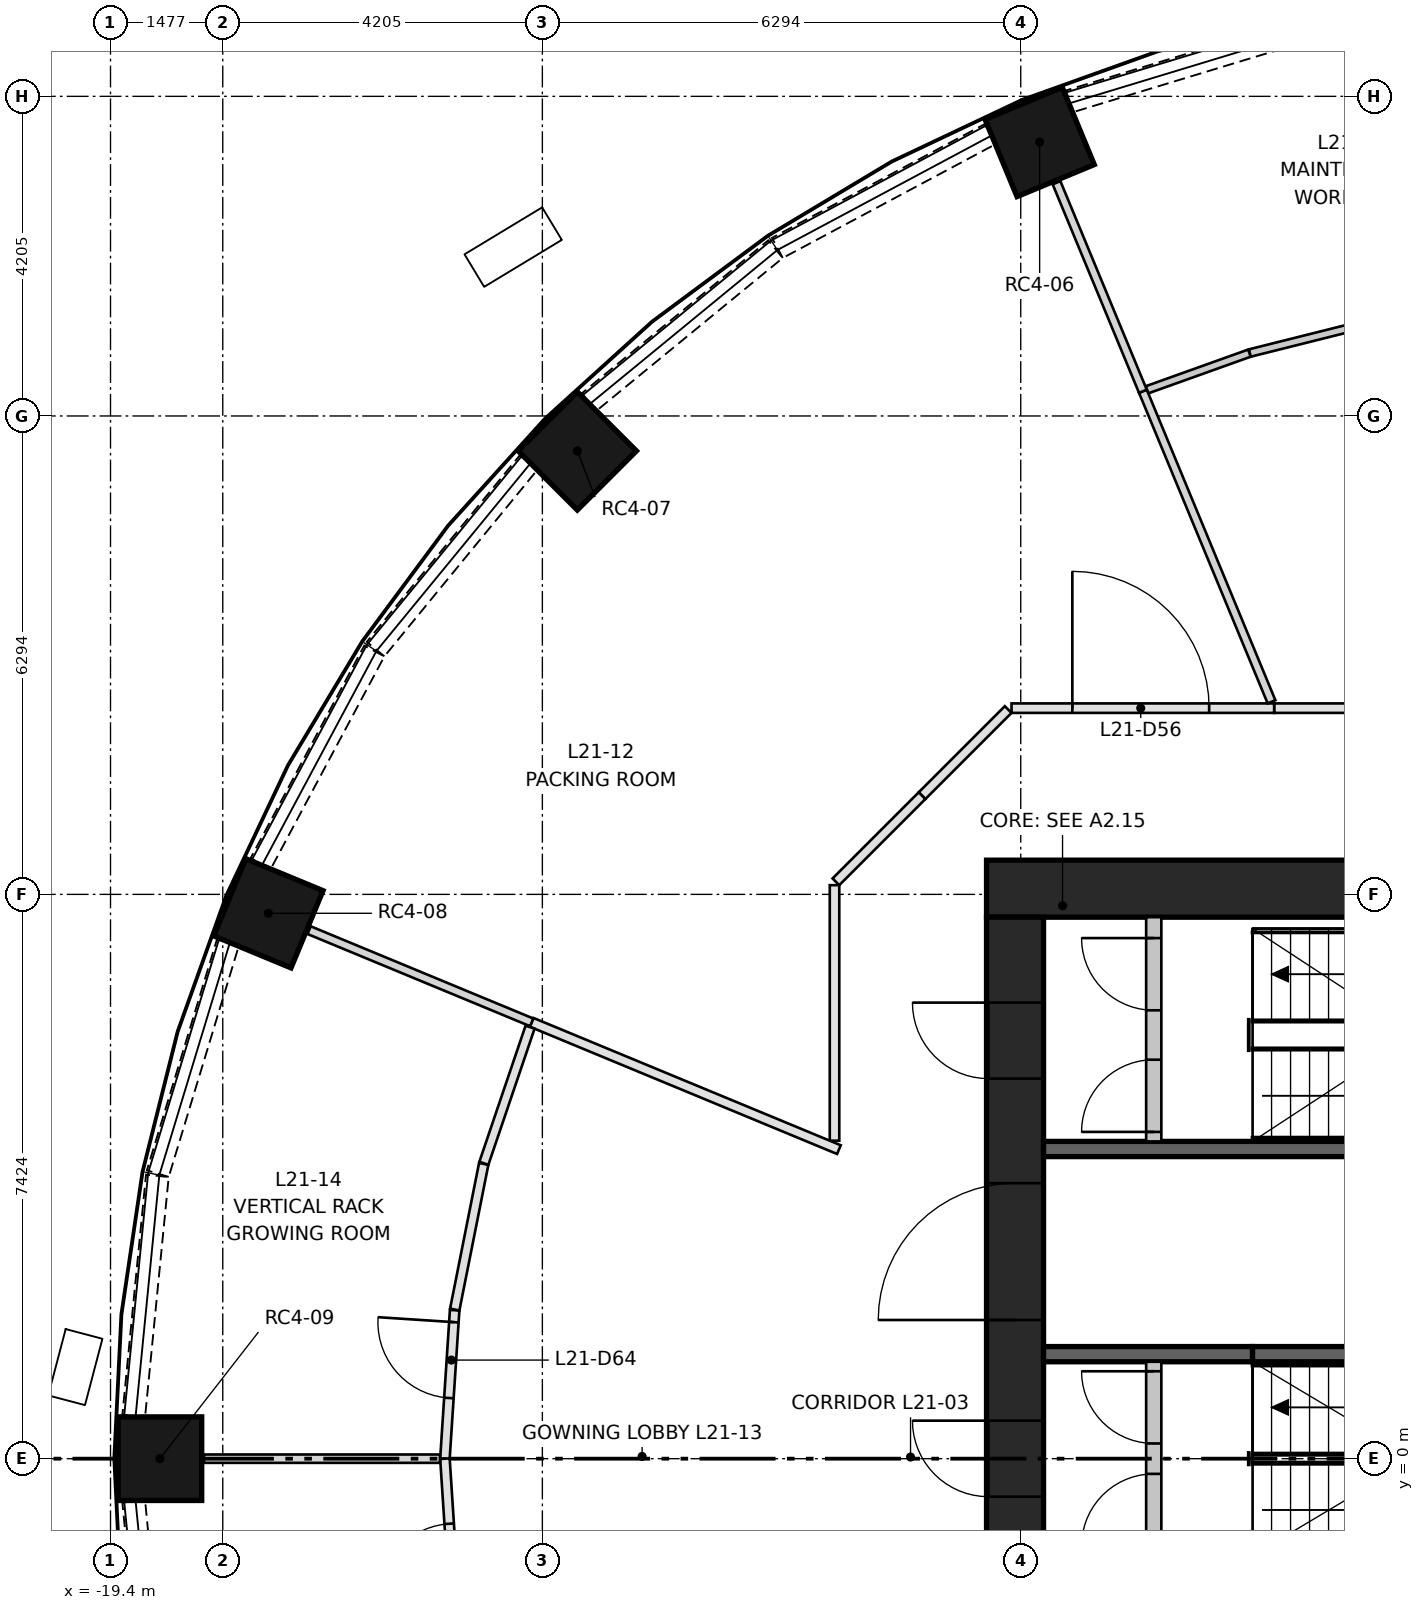
"""IFC4 building model, lengths in metres.
Left out: names, types, materials, properties, quantities, classifications, styles, units other than length and angle.
Written with IfcOpenShell. Run it as: python <this file> out.ifc"""

import sys

from ifc_helpers import new_model, si_unit, direction, frame, frame_2d, origin, origin_2d, place, context, subcontext, project, spatial, rectangle, extrude, element, fill, save


model = new_model("IFC4")
c1 = context("Model", 3, precision=1e-05, world=origin(), true_north=direction((0.0, 1.0)))
c2 = subcontext(c1, "Body", "Model", "MODEL_VIEW")
j1 = project(units=[si_unit("LENGTHUNIT", "METRE"), si_unit("PLANEANGLEUNIT", "RADIAN")], contexts=[c1])
p1 = place(None, origin())
s1 = spatial("IfcSite", under=j1, at=p1, CompositionType="ELEMENT")
p2 = place(p1, origin())
s2 = spatial("IfcBuilding", under=s1, at=p2, CompositionType="ELEMENT")
p3 = place(p2, frame((0.0, 0.0, 83.7)))
s3 = spatial("IfcBuildingStorey", under=s2, at=p3, CompositionType="ELEMENT", Elevation=83.7)
for number, where, z_axis, x_axis in (
    (1, (-7.175, 17.323, 0.0), (0.0, 0.0, 1.0), (-0.383, 0.924, 0.0)),
    (2, (-13.258, 13.258, 0.0), (0.0, 0.0, 1.0), (-0.707, 0.707, 0.0)),
    (3, (-17.323, 7.175, 0.0), (0.0, 0.0, 1.0), (-0.924, 0.383, 0.0)),
    (4, (-18.75, 0.0, 0.0), (0.0, 0.0, 1.0), (-1.0, 0.0, 0.0)),
):
    element("IfcColumn", number, at=place(p3, frame(where, z_axis=z_axis, x_axis=x_axis)), inside=s3, PredefinedType="COLUMN", context=c2, shape_type="SweptSolid", body=[
        extrude(rectangle(XDim=1.1, YDim=1.1, at=origin_2d()), origin(), (0.0, 0.0, 1.0), 3.65),
    ])
p4 = place(p3, frame((-7.874, 7.499, 0.0), z_axis=(0.0, 0.0, 1.0), x_axis=(1.0, 0.0, 0.0)))
e5 = element("IfcWall", 5, at=p4, inside=s3, PredefinedType="SHEAR", context=c2, shape_type="SweptSolid", body=[
    extrude(rectangle(XDim=15.748, YDim=0.75, at=frame_2d((7.874, 0.0))), origin(), (0.0, 0.0, 1.0), 3.65),
])
p5 = place(p3, frame((-7.499, -7.124, 0.0), z_axis=(0.0, 0.0, 1.0), x_axis=(0.0, 1.0, 0.0)))
e6 = element("IfcWall", 6, at=p5, inside=s3, PredefinedType="SHEAR", context=c2, shape_type="SweptSolid", body=[
    extrude(rectangle(XDim=14.248, YDim=0.75, at=frame_2d((7.124, 0.0))), origin(), (0.0, 0.0, 1.0), 3.65),
])
p6 = place(p5, frame((6.624, 0.0, 0.0)))
e7 = element("IfcOpeningElement", 7, at=p6, cuts=e6, PredefinedType="OPENING", context=c2, shape_type="SweptSolid", body=[
    extrude(rectangle(XDim=1.0, YDim=2.1, at=frame_2d((0.5, 1.05))), frame((0.0, 0.385, 0.0), z_axis=(0.0, -1.0, 0.0), x_axis=(1.0, 0.0, 0.0)), (0.0, 0.0, 1.0), 0.77),
])
p7 = place(p5, frame((3.5, 0.0, 0.0)))
e8 = element("IfcOpeningElement", 8, at=p7, cuts=e6, PredefinedType="OPENING", context=c2, shape_type="SweptSolid", body=[
    extrude(rectangle(XDim=1.8, YDim=2.1, at=frame_2d((0.9, 1.05))), frame((0.0, 0.385, 0.0), z_axis=(0.0, -1.0, 0.0), x_axis=(1.0, 0.0, 0.0)), (0.0, 0.0, 1.0), 0.77),
])
p8 = place(p5, frame((8.948, 0.0, 0.0)))
e9 = element("IfcOpeningElement", 9, at=p8, cuts=e6, PredefinedType="OPENING", context=c2, shape_type="SweptSolid", body=[
    extrude(rectangle(XDim=1.8, YDim=2.1, at=frame_2d((0.9, 1.05))), frame((0.0, 0.385, 0.0), z_axis=(0.0, -1.0, 0.0), x_axis=(1.0, 0.0, 0.0)), (0.0, 0.0, 1.0), 0.77),
])
p9 = place(p5, frame((12.124, 0.0, 0.0)))
e10 = element("IfcOpeningElement", 10, at=p9, cuts=e6, PredefinedType="OPENING", context=c2, shape_type="SweptSolid", body=[
    extrude(rectangle(XDim=1.0, YDim=2.1, at=frame_2d((0.5, 1.05))), frame((0.0, 0.385, 0.0), z_axis=(0.0, -1.0, 0.0), x_axis=(1.0, 0.0, 0.0)), (0.0, 0.0, 1.0), 0.77),
])
p10 = place(p3, frame((-7.124, 4.074, 0.0), z_axis=(0.0, 0.0, 1.0), x_axis=(1.0, 0.0, 0.0)))
e11 = element("IfcWall", 11, at=p10, inside=s3, PredefinedType="SHEAR", context=c2, shape_type="SweptSolid", body=[
    extrude(rectangle(XDim=7.124, YDim=0.2, at=frame_2d((3.562, 0.0))), origin(), (0.0, 0.0, 1.0), 3.3),
])
p11 = place(p3, frame((-7.124, 1.375, 0.0), z_axis=(0.0, 0.0, 1.0), x_axis=(1.0, 0.0, 0.0)))
e12 = element("IfcWall", 12, at=p11, inside=s3, PredefinedType="SHEAR", context=c2, shape_type="SweptSolid", body=[
    extrude(rectangle(XDim=2.75, YDim=0.2, at=frame_2d((1.375, 0.0))), origin(), (0.0, 0.0, 1.0), 3.3),
])
p12 = place(p3, frame((-4.374, 1.375, 0.0), z_axis=(0.0, 0.0, 1.0), x_axis=(1.0, 0.0, 0.0)))
e13 = element("IfcWall", 13, at=p12, inside=s3, PredefinedType="SHEAR", context=c2, shape_type="SweptSolid", body=[
    extrude(rectangle(XDim=4.374, YDim=0.2, at=frame_2d((2.187, 0.0))), origin(), (0.0, 0.0, 1.0), 3.3),
])
p13 = place(p3, frame((-5.674, -1.275, 0.0), z_axis=(0.0, 0.0, 1.0), x_axis=(0.0, 1.0, 0.0)))
e14 = element("IfcWall", 14, at=p13, inside=s3, PredefinedType="PARTITIONING", context=c2, shape_type="SweptSolid", body=[
    extrude(rectangle(XDim=2.55, YDim=0.2, at=frame_2d((1.275, 0.0))), origin(), (0.0, 0.0, 1.0), 3.3),
])
p14 = place(p13, frame((0.125, 0.0, 0.0)))
e15 = element("IfcOpeningElement", 15, at=p14, cuts=e14, PredefinedType="OPENING", context=c2, shape_type="SweptSolid", body=[
    extrude(rectangle(XDim=0.95, YDim=2.1, at=frame_2d((0.475, 1.05))), frame((0.0, 0.11, 0.0), z_axis=(0.0, -1.0, 0.0), x_axis=(1.0, 0.0, 0.0)), (0.0, 0.0, 1.0), 0.22),
])
p15 = place(p13, frame((1.475, 0.0, 0.0)))
e16 = element("IfcOpeningElement", 16, at=p15, cuts=e14, PredefinedType="OPENING", context=c2, shape_type="SweptSolid", body=[
    extrude(rectangle(XDim=0.95, YDim=2.1, at=frame_2d((0.475, 1.05))), frame((0.0, 0.11, 0.0), z_axis=(0.0, -1.0, 0.0), x_axis=(1.0, 0.0, 0.0)), (0.0, 0.0, 1.0), 0.22),
])
p16 = place(p3, frame((-5.674, 4.174, 0.0), z_axis=(0.0, 0.0, 1.0), x_axis=(0.0, 1.0, 0.0)))
e17 = element("IfcWall", 17, at=p16, inside=s3, PredefinedType="PARTITIONING", context=c2, shape_type="SweptSolid", body=[
    extrude(rectangle(XDim=2.95, YDim=0.2, at=frame_2d((1.475, 0.0))), origin(), (0.0, 0.0, 1.0), 3.3),
])
p17 = place(p16, frame((0.125, 0.0, 0.0)))
e18 = element("IfcOpeningElement", 18, at=p17, cuts=e17, PredefinedType="OPENING", context=c2, shape_type="SweptSolid", body=[
    extrude(rectangle(XDim=0.95, YDim=2.1, at=frame_2d((0.475, 1.05))), frame((0.0, 0.11, 0.0), z_axis=(0.0, -1.0, 0.0), x_axis=(1.0, 0.0, 0.0)), (0.0, 0.0, 1.0), 0.22),
])
p18 = place(p16, frame((1.725, 0.0, 0.0)))
e19 = element("IfcOpeningElement", 19, at=p18, cuts=e17, PredefinedType="OPENING", context=c2, shape_type="SweptSolid", body=[
    extrude(rectangle(XDim=0.95, YDim=2.1, at=frame_2d((0.475, 1.05))), frame((0.0, 0.11, 0.0), z_axis=(0.0, -1.0, 0.0), x_axis=(1.0, 0.0, 0.0)), (0.0, 0.0, 1.0), 0.22),
])
p19 = place(p3, frame((-3.75, 18.778, 0.0), z_axis=(0.0, 0.0, 1.0), x_axis=(-0.956927923582, -0.290325591482, 0.0)))
e20 = element("IfcWall", 20, at=p19, inside=s3, PredefinedType="SOLIDWALL", context=c2, shape_type="SweptSolid", body=[
    extrude(rectangle(XDim=3.173, YDim=0.3, at=frame_2d((1.586, 0.0))), origin(), (0.0, 0.0, 1.0), 0.9),
])
p20 = place(p3, frame((-7.828, 17.425, 0.0), z_axis=(0.0, 0.0, 1.0), x_axis=(-0.88188808669, -0.471458802606, 0.0)))
e21 = element("IfcWall", 21, at=p20, inside=s3, PredefinedType="SOLIDWALL", context=c2, shape_type="SweptSolid", body=[
    extrude(rectangle(XDim=3.172, YDim=0.3, at=frame_2d((1.586, 0.0))), origin(), (0.0, 0.0, 1.0), 0.9),
])
for number, where, z_axis, x_axis in (
    (22, (-10.651, 15.913, 0.0), (0.0, 0.0, 1.0), (-0.773, -0.634, 0.0)),
    (23, (-13.9, 13.104, 0.0), (0.0, 0.0, 1.0), (-0.634, -0.773, 0.0)),
):
    element("IfcWall", number, at=place(p3, frame(where, z_axis=z_axis, x_axis=x_axis)), inside=s3, PredefinedType="SOLIDWALL", context=c2, shape_type="SweptSolid", body=[
        extrude(rectangle(XDim=3.173, YDim=0.3, at=frame_2d((1.586, 0.0))), origin(), (0.0, 0.0, 1.0), 0.9),
    ])
p21 = place(p3, frame((-15.929, 10.626, 0.0), z_axis=(0.0, 0.0, 1.0), x_axis=(-0.471458802606, -0.88188808669, 0.0)))
e24 = element("IfcWall", 24, at=p21, inside=s3, PredefinedType="SOLIDWALL", context=c2, shape_type="SweptSolid", body=[
    extrude(rectangle(XDim=3.172, YDim=0.3, at=frame_2d((1.586, 0.0))), origin(), (0.0, 0.0, 1.0), 0.9),
])
p22 = place(p3, frame((-17.856, 6.787, 0.0), z_axis=(0.0, 0.0, 1.0), x_axis=(-0.290325591482, -0.956927923582, 0.0)))
e25 = element("IfcWall", 25, at=p22, inside=s3, PredefinedType="SOLIDWALL", context=c2, shape_type="SweptSolid", body=[
    extrude(rectangle(XDim=3.173, YDim=0.3, at=frame_2d((1.586, 0.0))), origin(), (0.0, 0.0, 1.0), 0.9),
])
for number, where, z_axis, x_axis in (
    (26, (-18.783, 3.721, 0.0), (0.0, 0.0, 1.0), (-0.098, -0.995, 0.0)),
    (27, (-19.094, -0.564, 0.0), (0.0, 0.0, 1.0), (0.098, -0.995, 0.0)),
):
    element("IfcWall", number, at=place(p3, frame(where, z_axis=z_axis, x_axis=x_axis)), inside=s3, PredefinedType="SOLIDWALL", context=c2, shape_type="SweptSolid", body=[
        extrude(rectangle(XDim=3.173, YDim=0.3, at=frame_2d((1.586, 0.0))), origin(), (0.0, 0.0, 1.0), 0.9),
    ])
p23 = place(p3, frame((-4.09, 9.874, 0.0), z_axis=(0.0, 0.0, 1.0), x_axis=(1.0, 0.0, 0.0)))
e28 = element("IfcWall", 28, at=p23, inside=s3, PredefinedType="PARTITIONING", context=c2, shape_type="SweptSolid", body=[
    extrude(rectangle(XDim=8.18, YDim=0.125, at=frame_2d((4.09, 0.0))), origin(), (0.0, 0.0, 1.0), 3.3),
])
p24 = place(p23, frame((3.6, 0.0, 0.0)))
e29 = element("IfcOpeningElement", 29, at=p24, cuts=e28, PredefinedType="OPENING", context=c2, shape_type="SweptSolid", body=[
    extrude(rectangle(XDim=1.0, YDim=2.1, at=frame_2d((0.5, 1.05))), frame((0.0, 0.073, 0.0), z_axis=(0.0, -1.0, 0.0), x_axis=(1.0, 0.0, 0.0)), (0.0, 0.0, 1.0), 0.145),
])
p25 = place(p3, frame((-8.722, 8.722, 0.0), z_axis=(0.0, 0.0, 1.0), x_axis=(0.707030604857, 0.70718294931, 0.0)))
e30 = element("IfcWall", 30, at=p25, inside=s3, PredefinedType="PARTITIONING", context=c2, shape_type="SweptSolid", body=[
    extrude(rectangle(XDim=1.603, YDim=0.125, at=frame_2d((0.801, 0.0))), origin(), (0.0, 0.0, 1.0), 3.3),
])
p26 = place(p3, frame((-7.545, 9.874, 0.0), z_axis=(0.0, 0.0, 1.0), x_axis=(1.0, 0.0, 0.0)))
e31 = element("IfcWall", 31, at=p26, inside=s3, PredefinedType="PARTITIONING", context=c2, shape_type="SweptSolid", body=[
    extrude(rectangle(XDim=3.455, YDim=0.125, at=frame_2d((1.728, 0.0))), origin(), (0.0, 0.0, 1.0), 3.3),
])
p27 = place(p26, frame((0.8, 0.0, 0.0)))
e32 = element("IfcOpeningElement", 32, at=p27, cuts=e31, PredefinedType="OPENING", context=c2, shape_type="SweptSolid", body=[
    extrude(rectangle(XDim=1.8, YDim=2.1, at=frame_2d((0.9, 1.05))), frame((0.0, 0.073, 0.0), z_axis=(0.0, -1.0, 0.0), x_axis=(1.0, 0.0, 0.0)), (0.0, 0.0, 1.0), 0.145),
])
p28 = place(p3, frame((-9.874, 4.183, 0.0), z_axis=(0.0, 0.0, 1.0), x_axis=(0.0, 1.0, 0.0)))
e33 = element("IfcWall", 33, at=p28, inside=s3, PredefinedType="PARTITIONING", context=c2, shape_type="SweptSolid", body=[
    extrude(rectangle(XDim=3.362, YDim=0.125, at=frame_2d((1.681, 0.0))), origin(), (0.0, 0.0, 1.0), 3.3),
])
p29 = place(p3, frame((-9.856, 7.589, 0.0), z_axis=(0.0, 0.0, 1.0), x_axis=(0.70718294931, 0.707030604857, 0.0)))
e34 = element("IfcWall", 34, at=p29, inside=s3, PredefinedType="PARTITIONING", context=c2, shape_type="SweptSolid", body=[
    extrude(rectangle(XDim=1.603, YDim=0.125, at=frame_2d((0.801, 0.0))), origin(), (0.0, 0.0, 1.0), 3.3),
])
p30 = place(p3, frame((-5.763, 14.062, 0.0), z_axis=(0.0, 0.0, 1.0), x_axis=(0.941587499657, 0.33676843749, 0.0)))
e35 = element("IfcWall", 35, at=p30, inside=s3, PredefinedType="PARTITIONING", context=c2, shape_type="SweptSolid", body=[
    extrude(rectangle(XDim=1.432, YDim=0.1, at=frame_2d((0.716, 0.0))), origin(), (0.0, 0.0, 1.0), 3.3),
])
p31 = place(p3, frame((-4.41, 14.546, 0.0), z_axis=(0.0, 0.0, 1.0), x_axis=(0.970055497102, 0.242883372306, 0.0)))
e36 = element("IfcWall", 36, at=p31, inside=s3, PredefinedType="PARTITIONING", context=c2, shape_type="SweptSolid", body=[
    extrude(rectangle(XDim=1.487, YDim=0.1, at=frame_2d((0.743, 0.0))), origin(), (0.0, 0.0, 1.0), 3.3),
])
p32 = place(p3, frame((-4.125, 9.958, 0.0), z_axis=(0.0, 0.0, 1.0), x_axis=(-0.382709362011, 0.923868791674, 0.0)))
e37 = element("IfcWall", 37, at=p32, inside=s3, PredefinedType="PARTITIONING", context=c2, shape_type="SweptSolid", body=[
    extrude(rectangle(XDim=4.422, YDim=0.11, at=frame_2d((2.211, 0.0))), origin(), (0.0, 0.0, 1.0), 3.3),
])
p33 = place(p3, frame((-5.817, 14.043, 0.0), z_axis=(0.0, 0.0, 1.0), x_axis=(-0.382659139036, 0.923889594764, 0.0)))
e38 = element("IfcWall", 38, at=p33, inside=s3, PredefinedType="PARTITIONING", context=c2, shape_type="SweptSolid", body=[
    extrude(rectangle(XDim=2.97, YDim=0.11, at=frame_2d((1.485, 0.0))), origin(), (0.0, 0.0, 1.0), 3.3),
])
p34 = place(p3, frame((-9.816, 4.066, 0.0), z_axis=(0.0, 0.0, 1.0), x_axis=(-0.923865829688, 0.382716512232, 0.0)))
e39 = element("IfcWall", 39, at=p34, inside=s3, PredefinedType="PARTITIONING", context=c2, shape_type="SweptSolid", body=[
    extrude(rectangle(XDim=4.375, YDim=0.125, at=frame_2d((2.188, 0.0))), origin(), (0.0, 0.0, 1.0), 3.3),
])
p35 = place(p3, frame((-13.858, 5.74, 0.0), z_axis=(0.0, 0.0, 1.0), x_axis=(-0.923876970079, 0.382689618566, 0.0)))
e40 = element("IfcWall", 40, at=p35, inside=s3, PredefinedType="PARTITIONING", context=c2, shape_type="SweptSolid", body=[
    extrude(rectangle(XDim=3.17, YDim=0.11, at=frame_2d((1.585, 0.0))), origin(), (0.0, 0.0, 1.0), 3.3),
])
p36 = place(p3, frame((-15.0, 0.0, 0.0), z_axis=(0.0, 0.0, 1.0), x_axis=(0.065335548621, 0.997863350407, 0.0)))
e41 = element("IfcWall", 41, at=p36, inside=s3, PredefinedType="PARTITIONING", context=c2, shape_type="SweptSolid", body=[
    extrude(rectangle(XDim=1.958, YDim=0.125, at=frame_2d((0.979, 0.0))), origin(), (0.0, 0.0, 1.0), 3.3),
])
p37 = place(p36, frame((0.8, 0.0, 0.0)))
e42 = element("IfcOpeningElement", 42, at=p37, cuts=e41, PredefinedType="OPENING", context=c2, shape_type="SweptSolid", body=[
    extrude(rectangle(XDim=1.0, YDim=2.1, at=frame_2d((0.5, 1.05))), frame((0.0, 0.073, 0.0), z_axis=(0.0, -1.0, 0.0), x_axis=(1.0, 0.0, 0.0)), (0.0, 0.0, 1.0), 0.145),
])
p38 = place(p3, frame((-14.871, 1.962, 0.0), z_axis=(0.0, 0.0, 1.0), x_axis=(0.195034785279, 0.980796325713, 0.0)))
e43 = element("IfcWall", 43, at=p38, inside=s3, PredefinedType="PARTITIONING", context=c2, shape_type="SweptSolid", body=[
    extrude(rectangle(XDim=1.954, YDim=0.125, at=frame_2d((0.977, 0.0))), origin(), (0.0, 0.0, 1.0), 3.3),
])
p39 = place(p3, frame((-14.488, 3.886, 0.0), z_axis=(0.0, 0.0, 1.0), x_axis=(0.321451389675, 0.946926081633, 0.0)))
e44 = element("IfcWall", 44, at=p39, inside=s3, PredefinedType="PARTITIONING", context=c2, shape_type="SweptSolid", body=[
    extrude(rectangle(XDim=1.891, YDim=0.125, at=frame_2d((0.946, 0.0))), origin(), (0.0, 0.0, 1.0), 3.3),
])
p40 = place(p3, frame((-14.872, -1.954, 0.0), z_axis=(0.0, 0.0, 1.0), x_axis=(-0.065335548621, 0.997863350407, 0.0)))
e45 = element("IfcWall", 45, at=p40, inside=s3, PredefinedType="PARTITIONING", context=c2, shape_type="SweptSolid", body=[
    extrude(rectangle(XDim=1.958, YDim=0.125, at=frame_2d((0.979, 0.0))), origin(), (0.0, 0.0, 1.0), 3.3),
])
p41 = place(p40, frame((0.1, 0.0, 0.0)))
e46 = element("IfcOpeningElement", 46, at=p41, cuts=e45, PredefinedType="OPENING", context=c2, shape_type="SweptSolid", body=[
    extrude(rectangle(XDim=1.0, YDim=2.1, at=frame_2d((0.5, 1.05))), frame((0.0, 0.073, 0.0), z_axis=(0.0, -1.0, 0.0), x_axis=(1.0, 0.0, 0.0)), (0.0, 0.0, 1.0), 0.145),
])
p42 = place(p3, frame((-15.066, 0.0, 0.0), z_axis=(0.0, 0.0, 1.0), x_axis=(-1.0, 0.0, 0.0)))
e47 = element("IfcWall", 47, at=p42, inside=s3, PredefinedType="PARTITIONING", context=c2, shape_type="SweptSolid", body=[
    extrude(rectangle(XDim=3.104, YDim=0.11, at=frame_2d((1.552, 0.0))), origin(), (0.0, 0.0, 1.0), 3.3),
])
p43 = place(p14, origin())
e48 = element("IfcDoor", 48, at=p43, inside=s3, OperationType="SINGLE_SWING_LEFT", PredefinedType="DOOR", context=c2, shape_type="SweptSolid", body=[
    extrude(rectangle(XDim=0.95, YDim=2.1, at=frame_2d((0.475, 1.05))), frame((0.0, 0.025, 0.0), z_axis=(0.0, -1.0, 0.0), x_axis=(1.0, 0.0, 0.0)), (0.0, 0.0, 1.0), 0.05),
])
fill(e15, e48)
p44 = place(p15, origin())
e49 = element("IfcDoor", 49, at=p44, inside=s3, OperationType="SINGLE_SWING_RIGHT", PredefinedType="DOOR", context=c2, shape_type="SweptSolid", body=[
    extrude(rectangle(XDim=0.95, YDim=2.1, at=frame_2d((0.475, 1.05))), frame((0.0, 0.025, 0.0), z_axis=(0.0, -1.0, 0.0), x_axis=(1.0, 0.0, 0.0)), (0.0, 0.0, 1.0), 0.05),
])
fill(e16, e49)
p45 = place(p17, origin())
e50 = element("IfcDoor", 50, at=p45, inside=s3, OperationType="SINGLE_SWING_LEFT", PredefinedType="DOOR", context=c2, shape_type="SweptSolid", body=[
    extrude(rectangle(XDim=0.95, YDim=2.1, at=frame_2d((0.475, 1.05))), frame((0.0, 0.025, 0.0), z_axis=(0.0, -1.0, 0.0), x_axis=(1.0, 0.0, 0.0)), (0.0, 0.0, 1.0), 0.05),
])
fill(e18, e50)
p46 = place(p18, origin())
e51 = element("IfcDoor", 51, at=p46, inside=s3, OperationType="SINGLE_SWING_RIGHT", PredefinedType="DOOR", context=c2, shape_type="SweptSolid", body=[
    extrude(rectangle(XDim=0.95, YDim=2.1, at=frame_2d((0.475, 1.05))), frame((0.0, 0.025, 0.0), z_axis=(0.0, -1.0, 0.0), x_axis=(1.0, 0.0, 0.0)), (0.0, 0.0, 1.0), 0.05),
])
fill(e19, e51)
p47 = place(p6, origin())
e52 = element("IfcDoor", 52, at=p47, inside=s3, OperationType="SINGLE_SWING_RIGHT", PredefinedType="DOOR", context=c2, shape_type="SweptSolid", body=[
    extrude(rectangle(XDim=1.0, YDim=2.1, at=frame_2d((0.5, 1.05))), frame((0.0, 0.375, 0.0), z_axis=(0.0, -1.0, 0.0), x_axis=(1.0, 0.0, 0.0)), (0.0, 0.0, 1.0), 0.05),
])
fill(e7, e52)
p48 = place(p8, origin())
e53 = element("IfcDoor", 53, at=p48, inside=s3, OperationType="DOUBLE_DOOR_SINGLE_SWING", PredefinedType="DOOR", context=c2, shape_type="SweptSolid", body=[
    extrude(rectangle(XDim=1.8, YDim=2.1, at=frame_2d((0.9, 1.05))), frame((0.0, 0.025, 0.0), z_axis=(0.0, -1.0, 0.0), x_axis=(1.0, 0.0, 0.0)), (0.0, 0.0, 1.0), 0.05),
])
fill(e9, e53)
p49 = place(p9, origin())
e54 = element("IfcDoor", 54, at=p49, inside=s3, OperationType="SINGLE_SWING_RIGHT", PredefinedType="DOOR", context=c2, shape_type="SweptSolid", body=[
    extrude(rectangle(XDim=1.0, YDim=2.1, at=frame_2d((0.5, 1.05))), frame((0.0, 0.375, 0.0), z_axis=(0.0, -1.0, 0.0), x_axis=(1.0, 0.0, 0.0)), (0.0, 0.0, 1.0), 0.05),
])
fill(e10, e54)
p50 = place(p27, origin())
e55 = element("IfcDoor", 55, at=p50, inside=s3, OperationType="DOUBLE_DOOR_SINGLE_SWING", PredefinedType="DOOR", context=c2, shape_type="SweptSolid", body=[
    extrude(rectangle(XDim=1.8, YDim=2.1, at=frame_2d((0.9, 1.05))), frame((0.0, 0.025, 0.0), z_axis=(0.0, -1.0, 0.0), x_axis=(1.0, 0.0, 0.0)), (0.0, 0.0, 1.0), 0.05),
])
fill(e32, e55)
p51 = place(p37, origin())
e56 = element("IfcDoor", 56, at=p51, inside=s3, OperationType="SINGLE_SWING_RIGHT", PredefinedType="DOOR", context=c2, shape_type="SweptSolid", body=[
    extrude(rectangle(XDim=1.0, YDim=2.1, at=frame_2d((0.5, 1.05))), frame((0.0, 0.025, 0.0), z_axis=(0.0, -1.0, 0.0), x_axis=(1.0, 0.0, 0.0)), (0.0, 0.0, 1.0), 0.05),
])
fill(e42, e56)
p52 = place(p41, origin())
e57 = element("IfcDoor", 57, at=p52, inside=s3, OperationType="SINGLE_SWING_LEFT", PredefinedType="DOOR", context=c2, shape_type="SweptSolid", body=[
    extrude(rectangle(XDim=1.0, YDim=2.1, at=frame_2d((0.5, 1.05))), frame((0.0, 0.025, 0.0), z_axis=(0.0, -1.0, 0.0), x_axis=(1.0, 0.0, 0.0)), (0.0, 0.0, 1.0), 0.05),
])
fill(e46, e57)
save(model, sys.argv[1])
